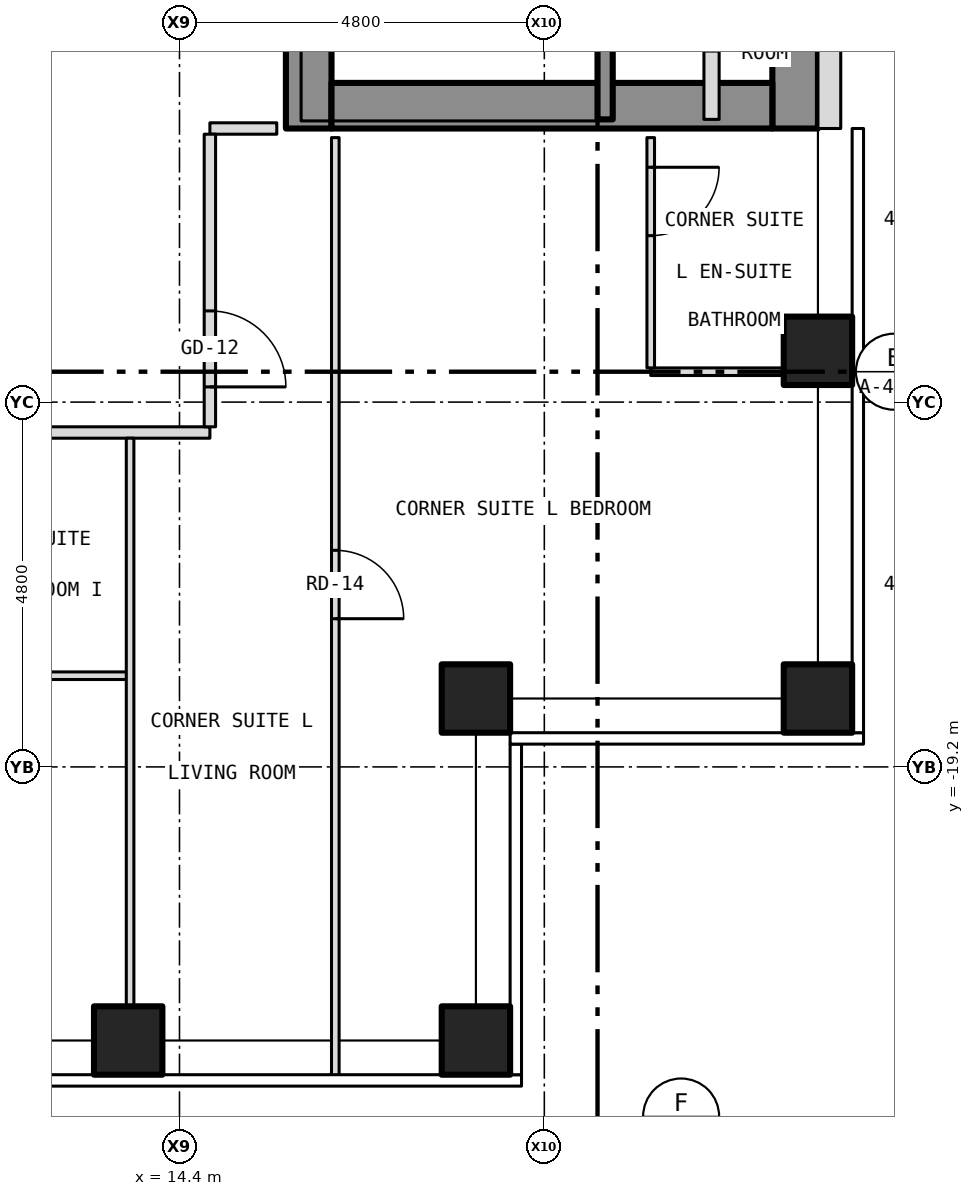
"""IFC4 building model, lengths in metres.
Left out: names, types, materials, properties, quantities, classifications, styles, units other than length and angle.
Written with IfcOpenShell. Run it as: python <this file> out.ifc"""

import sys

from ifc_helpers import new_model, si_unit, direction, frame, frame_2d, origin, origin_2d, place, context, subcontext, project, spatial, rectangle, hollow_rectangle, extrude, element, fill, save


model = new_model("IFC4")
c1 = context("Model", 3, precision=1e-05, world=origin(), true_north=direction((0.0, 1.0)))
c2 = subcontext(c1, "Body", "Model", "MODEL_VIEW")
j1 = project(units=[si_unit("LENGTHUNIT", "METRE"), si_unit("PLANEANGLEUNIT", "RADIAN")], contexts=[c1])
p1 = place(None, origin())
s1 = spatial("IfcSite", under=j1, at=p1, CompositionType="ELEMENT")
p2 = place(p1, origin())
s2 = spatial("IfcBuilding", under=s1, at=p2, CompositionType="ELEMENT")
p3 = place(p2, frame((0.0, 0.0, 92.5)))
s3 = spatial("IfcBuildingStorey", under=s2, at=p3, CompositionType="ELEMENT", Elevation=92.5)
for number, where, z_axis, x_axis in (
    (1, (13.725, -22.8, -0.15), (0.0, 0.0, 1.0), (1.0, 0.0, 0.0)),
    (2, (18.3, -22.8, -0.15), (0.0, 0.0, 1.0), (1.0, 0.0, 0.0)),
    (3, (22.8, -18.3, -0.15), (0.0, 0.0, 1.0), (1.0, 0.0, 0.0)),
    (4, (22.8, -13.725, -0.15), (0.0, 0.0, 1.0), (1.0, 0.0, 0.0)),
    (5, (18.3, -18.3, -0.15), (0.0, 0.0, 1.0), (1.0, 0.0, 0.0)),
):
    element("IfcColumn", number, at=place(p3, frame(where, z_axis=z_axis, x_axis=x_axis)), inside=s3, PredefinedType="COLUMN", context=c2, shape_type="SweptSolid", body=[
        extrude(hollow_rectangle(XDim=0.9, YDim=0.9, WallThickness=0.05, at=origin_2d()), origin(), (0.0, 0.0, 1.0), 3.5),
    ])
p4 = place(p3, frame((16.1, -10.8, 0.0), z_axis=(0.0, 0.0, 1.0), x_axis=(0.0, 1.0, 0.0)))
e6 = element("IfcWall", 6, at=p4, inside=s3, PredefinedType="SHEAR", context=c2, shape_type="SweptSolid", body=[
    extrude(rectangle(XDim=21.6, YDim=0.6, at=frame_2d((10.8, 0.0))), origin(), (0.0, 0.0, 1.0), 3.25),
])
p5 = place(p4, frame((9.4, 0.0, 0.0)))
e7 = element("IfcOpeningElement", 7, at=p5, cuts=e6, PredefinedType="OPENING", context=c2, shape_type="SweptSolid", body=[
    extrude(rectangle(XDim=1.1, YDim=2.1, at=frame_2d((0.55, 1.05))), frame((0.0, 0.312, 0.0), z_axis=(0.0, -1.0, 0.0), x_axis=(1.0, 0.0, 0.0)), (0.0, 0.0, 1.0), 0.624),
])
p6 = place(p4, frame((11.5, 0.0, 0.0)))
e8 = element("IfcOpeningElement", 8, at=p6, cuts=e6, PredefinedType="OPENING", context=c2, shape_type="SweptSolid", body=[
    extrude(rectangle(XDim=1.1, YDim=2.1, at=frame_2d((0.55, 1.05))), frame((0.0, 0.312, 0.0), z_axis=(0.0, -1.0, 0.0), x_axis=(1.0, 0.0, 0.0)), (0.0, 0.0, 1.0), 0.624),
])
p7 = place(p4, frame((13.6, 0.0, 0.0)))
e9 = element("IfcOpeningElement", 9, at=p7, cuts=e6, PredefinedType="OPENING", context=c2, shape_type="SweptSolid", body=[
    extrude(rectangle(XDim=1.1, YDim=2.1, at=frame_2d((0.55, 1.05))), frame((0.0, 0.312, 0.0), z_axis=(0.0, -1.0, 0.0), x_axis=(1.0, 0.0, 0.0)), (0.0, 0.0, 1.0), 0.624),
])
p8 = place(p4, frame((15.7, 0.0, 0.0)))
e10 = element("IfcOpeningElement", 10, at=p8, cuts=e6, PredefinedType="OPENING", context=c2, shape_type="SweptSolid", body=[
    extrude(rectangle(XDim=1.1, YDim=2.1, at=frame_2d((0.55, 1.05))), frame((0.0, 0.312, 0.0), z_axis=(0.0, -1.0, 0.0), x_axis=(1.0, 0.0, 0.0)), (0.0, 0.0, 1.0), 0.624),
])
p9 = place(p4, frame((17.8, 0.0, 0.0)))
e11 = element("IfcOpeningElement", 11, at=p9, cuts=e6, PredefinedType="OPENING", context=c2, shape_type="SweptSolid", body=[
    extrude(rectangle(XDim=1.1, YDim=2.1, at=frame_2d((0.55, 1.05))), frame((0.0, 0.312, 0.0), z_axis=(0.0, -1.0, 0.0), x_axis=(1.0, 0.0, 0.0)), (0.0, 0.0, 1.0), 0.624),
])
p10 = place(p4, frame((5.642, 0.0, 0.0)))
e12 = element("IfcOpeningElement", 12, at=p10, cuts=e6, PredefinedType="OPENING", context=c2, shape_type="SweptSolid", body=[
    extrude(rectangle(XDim=1.1, YDim=2.1, at=frame_2d((0.55, 1.05))), frame((0.0, 0.312, 0.0), z_axis=(0.0, -1.0, 0.0), x_axis=(1.0, 0.0, 0.0)), (0.0, 0.0, 1.0), 0.624),
])
p11 = place(p4, frame((7.5, 0.0, 0.0)))
e13 = element("IfcOpeningElement", 13, at=p11, cuts=e6, PredefinedType="OPENING", context=c2, shape_type="SweptSolid", body=[
    extrude(rectangle(XDim=1.1, YDim=2.1, at=frame_2d((0.55, 1.05))), frame((0.0, 0.312, 0.0), z_axis=(0.0, -1.0, 0.0), x_axis=(1.0, 0.0, 0.0)), (0.0, 0.0, 1.0), 0.624),
])
p12 = place(p3, frame((22.5, -10.8, 0.0), z_axis=(0.0, 0.0, 1.0), x_axis=(0.0, 1.0, 0.0)))
e14 = element("IfcWall", 14, at=p12, inside=s3, PredefinedType="SHEAR", context=c2, shape_type="SweptSolid", body=[
    extrude(rectangle(XDim=21.6, YDim=0.6, at=frame_2d((10.8, 0.0))), origin(), (0.0, 0.0, 1.0), 3.25),
])
p13 = place(p3, frame((16.4, -10.5, 0.0), z_axis=(0.0, 0.0, 1.0), x_axis=(1.0, 0.0, 0.0)))
e15 = element("IfcWall", 15, at=p13, inside=s3, PredefinedType="SHEAR", context=c2, shape_type="SweptSolid", body=[
    extrude(rectangle(XDim=5.8, YDim=0.6, at=frame_2d((2.9, 0.0))), origin(), (0.0, 0.0, 1.0), 3.25),
])
p14 = place(p3, frame((22.95, -10.8, 0.0), z_axis=(0.0, 0.0, 1.0), x_axis=(0.0, 1.0, 0.0)))
e16 = element("IfcWall", 16, at=p14, inside=s3, PredefinedType="SOLIDWALL", context=c2, shape_type="SweptSolid", body=[
    extrude(rectangle(XDim=21.6, YDim=0.3, at=frame_2d((10.8, 0.0))), origin(), (0.0, 0.0, 1.0), 3.5),
])
p15 = place(p14, frame((2.95, 0.0, 1.0)))
e17 = element("IfcOpeningElement", 17, at=p15, cuts=e16, PredefinedType="OPENING", context=c2, shape_type="SweptSolid", body=[
    extrude(rectangle(XDim=0.6, YDim=1.5, at=frame_2d((0.3, 0.75))), frame((0.0, 0.162, 0.0), z_axis=(0.0, -1.0, 0.0), x_axis=(1.0, 0.0, 0.0)), (0.0, 0.0, 1.0), 0.324),
])
p16 = place(p3, frame((11.55, -18.0, 0.0), z_axis=(0.0, 0.0, 1.0), x_axis=(1.0, 0.0, 0.0)))
e18 = element("IfcWall", 18, at=p16, inside=s3, PredefinedType="PARTITIONING", context=c2, shape_type="SweptSolid", body=[
    extrude(rectangle(XDim=2.2, YDim=0.1, at=frame_2d((1.1, 0.0))), origin(), (0.0, 0.0, 1.0), 3.35),
])
p17 = place(p3, frame((-14.8, -14.8, 0.0), z_axis=(0.0, 0.0, 1.0), x_axis=(1.0, 0.0, 0.0)))
e19 = element("IfcWall", 19, at=p17, inside=s3, PredefinedType="PARTITIONING", context=c2, shape_type="SweptSolid", body=[
    extrude(rectangle(XDim=29.6, YDim=0.15, at=frame_2d((14.8, 0.0))), origin(), (0.0, 0.0, 1.0), 3.35),
])
p18 = place(p17, frame((2.907, 0.0, 0.0)))
e20 = element("IfcOpeningElement", 20, at=p18, cuts=e19, PredefinedType="OPENING", context=c2, shape_type="SweptSolid", body=[
    extrude(rectangle(XDim=1.0, YDim=2.1, at=frame_2d((0.5, 1.05))), frame((0.0, 0.087, 0.0), z_axis=(0.0, -1.0, 0.0), x_axis=(1.0, 0.0, 0.0)), (0.0, 0.0, 1.0), 0.174),
])
p19 = place(p17, frame((10.826, 0.0, 0.0)))
e21 = element("IfcOpeningElement", 21, at=p19, cuts=e19, PredefinedType="OPENING", context=c2, shape_type="SweptSolid", body=[
    extrude(rectangle(XDim=1.0, YDim=2.1, at=frame_2d((0.5, 1.05))), frame((0.0, 0.087, 0.0), z_axis=(0.0, -1.0, 0.0), x_axis=(1.0, 0.0, 0.0)), (0.0, 0.0, 1.0), 0.174),
])
p20 = place(p17, frame((15.401, 0.0, 0.0)))
e22 = element("IfcOpeningElement", 22, at=p20, cuts=e19, PredefinedType="OPENING", context=c2, shape_type="SweptSolid", body=[
    extrude(rectangle(XDim=1.0, YDim=2.1, at=frame_2d((0.5, 1.05))), frame((0.0, 0.087, 0.0), z_axis=(0.0, -1.0, 0.0), x_axis=(1.0, 0.0, 0.0)), (0.0, 0.0, 1.0), 0.174),
])
p21 = place(p17, frame((18.919, 0.0, 0.0)))
e23 = element("IfcOpeningElement", 23, at=p21, cuts=e19, PredefinedType="OPENING", context=c2, shape_type="SweptSolid", body=[
    extrude(rectangle(XDim=1.0, YDim=2.1, at=frame_2d((0.5, 1.05))), frame((0.0, 0.087, 0.0), z_axis=(0.0, -1.0, 0.0), x_axis=(1.0, 0.0, 0.0)), (0.0, 0.0, 1.0), 0.174),
])
p22 = place(p17, frame((24.638, 0.0, 0.0)))
e24 = element("IfcOpeningElement", 24, at=p22, cuts=e19, PredefinedType="OPENING", context=c2, shape_type="SweptSolid", body=[
    extrude(rectangle(XDim=1.0, YDim=2.1, at=frame_2d((0.5, 1.05))), frame((0.0, 0.087, 0.0), z_axis=(0.0, -1.0, 0.0), x_axis=(1.0, 0.0, 0.0)), (0.0, 0.0, 1.0), 0.174),
])
p23 = place(p3, frame((20.6, -14.0, 0.0), z_axis=(0.0, 0.0, 1.0), x_axis=(1.0, 0.0, 0.0)))
e25 = element("IfcWall", 25, at=p23, inside=s3, PredefinedType="PARTITIONING", context=c2, shape_type="SweptSolid", body=[
    extrude(rectangle(XDim=2.08, YDim=0.1, at=frame_2d((1.04, 0.0))), origin(), (0.0, 0.0, 1.0), 3.35),
])
p24 = place(p3, frame((14.8, -10.8, 0.0), z_axis=(0.0, 0.0, 1.0), x_axis=(1.0, 0.0, 0.0)))
e26 = element("IfcWall", 26, at=p24, inside=s3, PredefinedType="PARTITIONING", context=c2, shape_type="SweptSolid", body=[
    extrude(rectangle(XDim=0.88, YDim=0.15, at=frame_2d((0.44, 0.0))), origin(), (0.0, 0.0, 1.0), 3.35),
])
p25 = place(p3, frame((13.75, -22.68, 0.0), z_axis=(0.0, 0.0, 1.0), x_axis=(0.0, 1.0, 0.0)))
e27 = element("IfcWall", 27, at=p25, inside=s3, PredefinedType="PARTITIONING", context=c2, shape_type="SweptSolid", body=[
    extrude(rectangle(XDim=7.805, YDim=0.1, at=frame_2d((3.902, 0.0))), origin(), (0.0, 0.0, 1.0), 3.35),
])
p26 = place(p3, frame((14.8, -14.725, 0.0), z_axis=(0.0, 0.0, 1.0), x_axis=(0.0, 1.0, 0.0)))
e28 = element("IfcWall", 28, at=p26, inside=s3, PredefinedType="PARTITIONING", context=c2, shape_type="SweptSolid", body=[
    extrude(rectangle(XDim=3.85, YDim=0.15, at=frame_2d((1.925, 0.0))), origin(), (0.0, 0.0, 1.0), 3.35),
])
p27 = place(p26, frame((0.525, 0.0, 0.0)))
e29 = element("IfcOpeningElement", 29, at=p27, cuts=e28, PredefinedType="OPENING", context=c2, shape_type="SweptSolid", body=[
    extrude(rectangle(XDim=1.0, YDim=2.1, at=frame_2d((0.5, 1.05))), frame((0.0, 0.087, 0.0), z_axis=(0.0, -1.0, 0.0), x_axis=(1.0, 0.0, 0.0)), (0.0, 0.0, 1.0), 0.174),
])
p28 = place(p3, frame((16.45, -23.28, 0.0), z_axis=(0.0, 0.0, 1.0), x_axis=(0.0, 1.0, 0.0)))
e30 = element("IfcWall", 30, at=p28, inside=s3, PredefinedType="PARTITIONING", context=c2, shape_type="SweptSolid", body=[
    extrude(rectangle(XDim=12.36, YDim=0.1, at=frame_2d((6.18, 0.0))), origin(), (0.0, 0.0, 1.0), 3.35),
])
p29 = place(p28, frame((6.03, 0.0, 0.0)))
e31 = element("IfcOpeningElement", 31, at=p29, cuts=e30, PredefinedType="OPENING", context=c2, shape_type="SweptSolid", body=[
    extrude(rectangle(XDim=0.9, YDim=2.1, at=frame_2d((0.45, 1.05))), frame((0.0, 0.062, 0.0), z_axis=(0.0, -1.0, 0.0), x_axis=(1.0, 0.0, 0.0)), (0.0, 0.0, 1.0), 0.124),
])
p30 = place(p3, frame((20.0, -10.68, 0.0), z_axis=(0.0, 0.0, 1.0), x_axis=(0.0, 1.0, 0.0)))
e32 = element("IfcWall", 32, at=p30, inside=s3, PredefinedType="SHEAR", context=c2, shape_type="SweptSolid", body=[
    extrude(rectangle(XDim=6.98, YDim=0.2, at=frame_2d((3.49, 0.0))), origin(), (0.0, 0.0, 1.0), 3.25),
])
p31 = place(p3, frame((20.6, -13.95, 0.0), z_axis=(0.0, 0.0, 1.0), x_axis=(0.0, 1.0, 0.0)))
e33 = element("IfcWall", 33, at=p31, inside=s3, PredefinedType="PARTITIONING", context=c2, shape_type="SweptSolid", body=[
    extrude(rectangle(XDim=3.03, YDim=0.1, at=frame_2d((1.515, 0.0))), origin(), (0.0, 0.0, 1.0), 3.35),
])
p32 = place(p31, frame((1.74, 0.0, 0.0)))
e34 = element("IfcOpeningElement", 34, at=p32, cuts=e33, PredefinedType="OPENING", context=c2, shape_type="SweptSolid", body=[
    extrude(rectangle(XDim=0.9, YDim=2.1, at=frame_2d((0.45, 1.05))), frame((0.0, 0.062, 0.0), z_axis=(0.0, -1.0, 0.0), x_axis=(1.0, 0.0, 0.0)), (0.0, 0.0, 1.0), 0.124),
])
p33 = place(p3, frame((21.4, -10.68, 0.0), z_axis=(0.0, 0.0, 1.0), x_axis=(0.0, 1.0, 0.0)))
e35 = element("IfcWall", 35, at=p33, inside=s3, PredefinedType="PARTITIONING", context=c2, shape_type="SweptSolid", body=[
    extrude(rectangle(XDim=8.68, YDim=0.2, at=frame_2d((4.34, 0.0))), origin(), (0.0, 0.0, 1.0), 3.25),
])
p34 = place(p33, frame((0.899, 0.0, 0.0)))
e36 = element("IfcOpeningElement", 36, at=p34, cuts=e35, PredefinedType="OPENING", context=c2, shape_type="SweptSolid", body=[
    extrude(rectangle(XDim=0.9, YDim=2.1, at=frame_2d((0.45, 1.05))), frame((0.0, 0.112, 0.0), z_axis=(0.0, -1.0, 0.0), x_axis=(1.0, 0.0, 0.0)), (0.0, 0.0, 1.0), 0.224),
])
p35 = place(p33, frame((3.569, 0.0, 0.0)))
e37 = element("IfcOpeningElement", 37, at=p35, cuts=e35, PredefinedType="OPENING", context=c2, shape_type="SweptSolid", body=[
    extrude(rectangle(XDim=0.9, YDim=2.1, at=frame_2d((0.45, 1.05))), frame((0.0, 0.112, 0.0), z_axis=(0.0, -1.0, 0.0), x_axis=(1.0, 0.0, 0.0)), (0.0, 0.0, 1.0), 0.224),
])
p36 = place(p33, frame((6.55, 0.0, 0.0)))
e38 = element("IfcOpeningElement", 38, at=p36, cuts=e35, PredefinedType="OPENING", context=c2, shape_type="SweptSolid", body=[
    extrude(rectangle(XDim=0.9, YDim=2.1, at=frame_2d((0.45, 1.05))), frame((0.0, 0.112, 0.0), z_axis=(0.0, -1.0, 0.0), x_axis=(1.0, 0.0, 0.0)), (0.0, 0.0, 1.0), 0.224),
])
p37 = place(p27, origin())
e39 = element("IfcDoor", 39, at=p37, inside=s3, OperationType="SINGLE_SWING_LEFT", PredefinedType="DOOR", context=c2, shape_type="SweptSolid", body=[
    extrude(rectangle(XDim=1.0, YDim=2.1, at=frame_2d((0.5, 1.05))), frame((0.0, 0.025, 0.0), z_axis=(0.0, -1.0, 0.0), x_axis=(1.0, 0.0, 0.0)), (0.0, 0.0, 1.0), 0.05),
])
fill(e29, e39)
p38 = place(p29, origin())
e40 = element("IfcDoor", 40, at=p38, inside=s3, OperationType="SINGLE_SWING_LEFT", PredefinedType="DOOR", context=c2, shape_type="SweptSolid", body=[
    extrude(rectangle(XDim=0.9, YDim=2.1, at=frame_2d((0.45, 1.05))), frame((0.0, 0.025, 0.0), z_axis=(0.0, -1.0, 0.0), x_axis=(1.0, 0.0, 0.0)), (0.0, 0.0, 1.0), 0.05),
])
fill(e31, e40)
p39 = place(p32, origin())
e41 = element("IfcDoor", 41, at=p39, inside=s3, OperationType="SINGLE_SWING_RIGHT", PredefinedType="DOOR", context=c2, shape_type="SweptSolid", body=[
    extrude(rectangle(XDim=0.9, YDim=2.1, at=frame_2d((0.45, 1.05))), frame((0.0, 0.025, 0.0), z_axis=(0.0, -1.0, 0.0), x_axis=(1.0, 0.0, 0.0)), (0.0, 0.0, 1.0), 0.05),
])
fill(e34, e41)
save(model, sys.argv[1])
